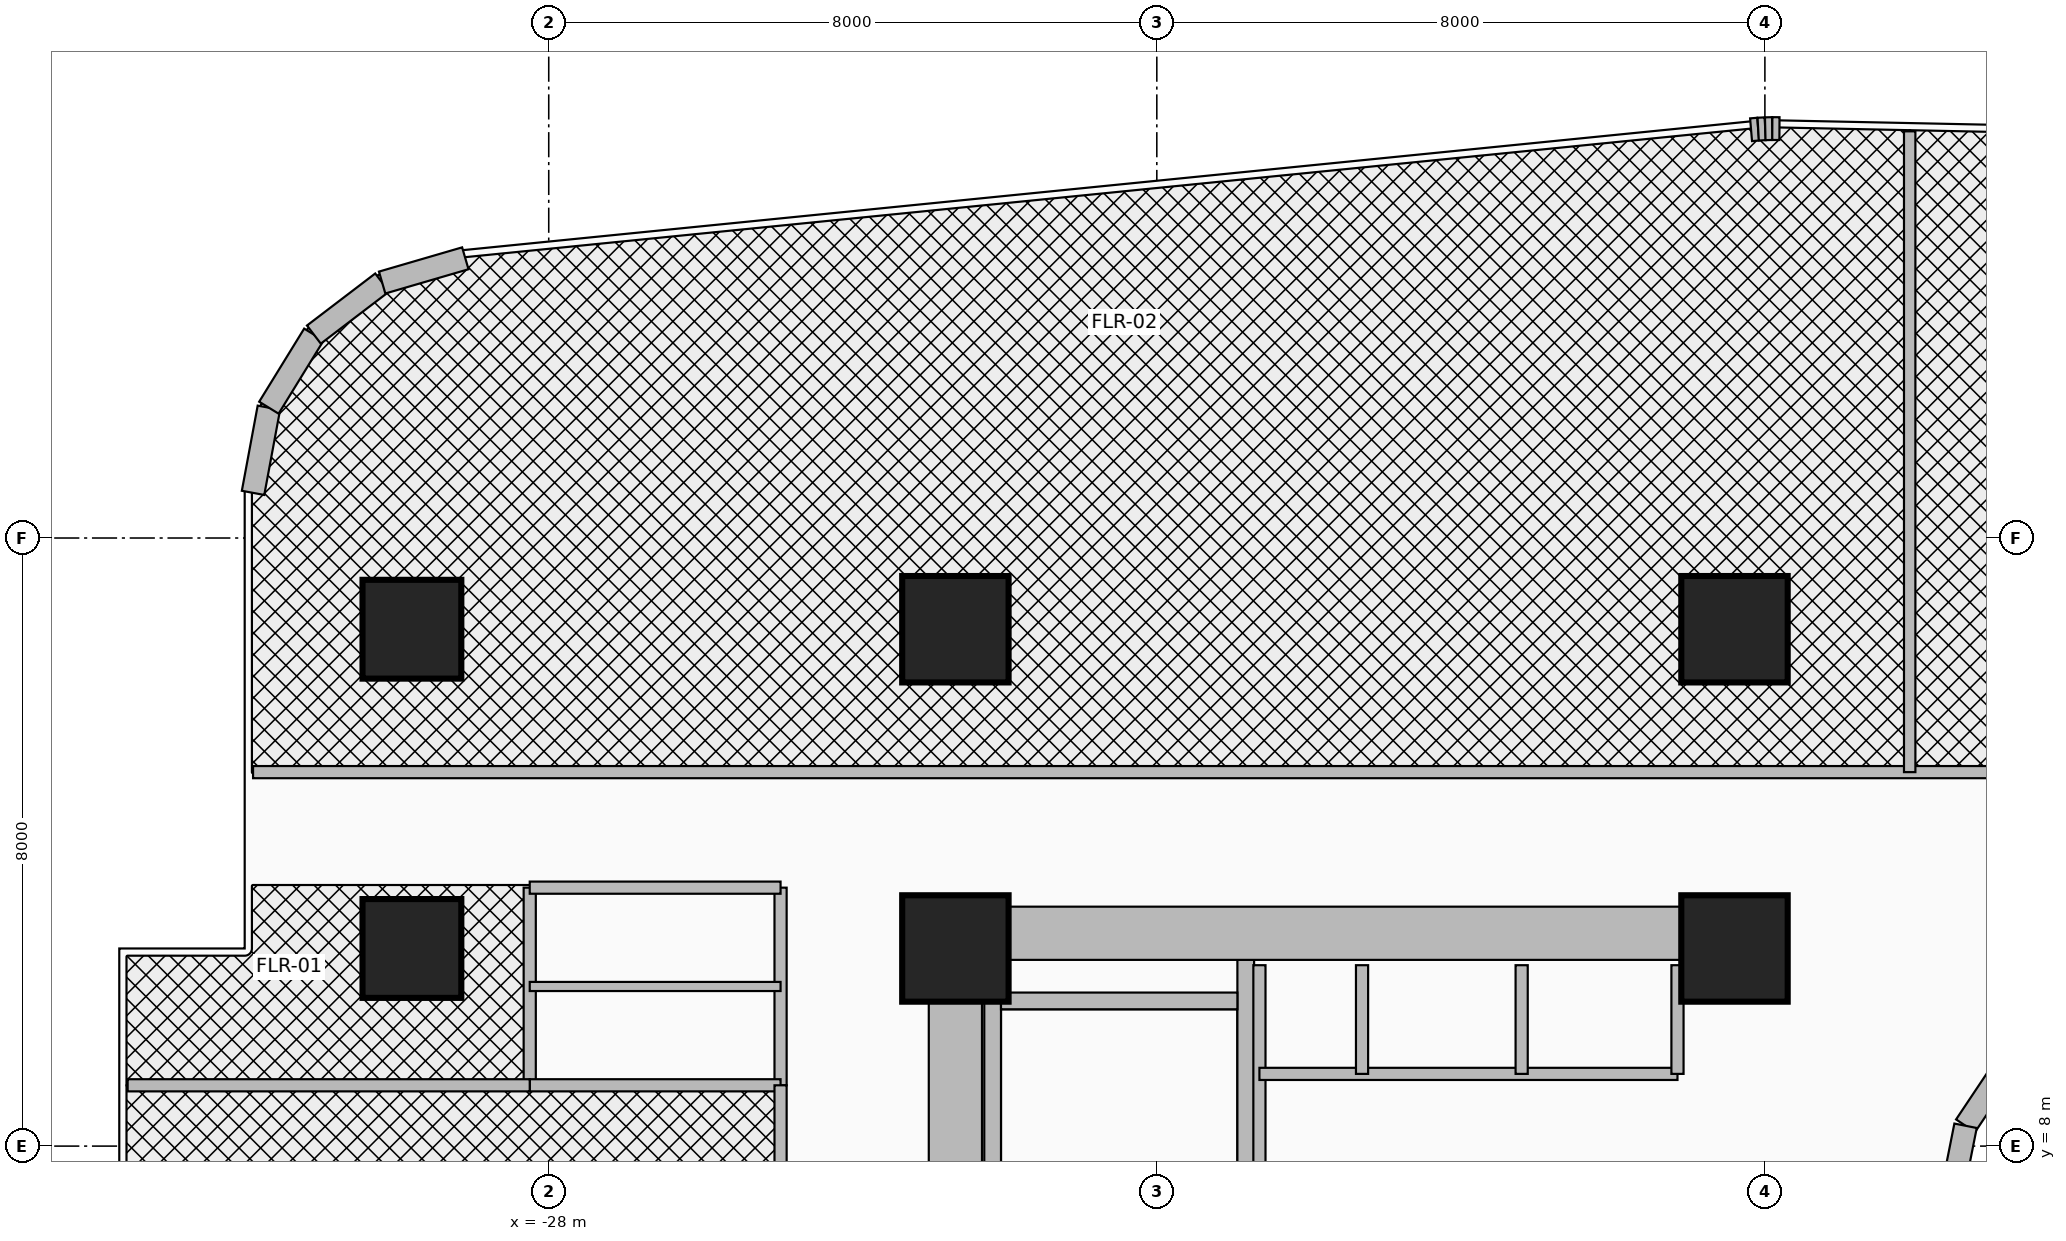
"""IFC4 building model, lengths in metres.
Left out: names, types, materials, properties, quantities, classifications, styles, units other than length and angle.
Written with IfcOpenShell. Run it as: python <this file> out.ifc"""

import sys

from ifc_helpers import new_model, si_unit, direction, frame, frame_2d, origin, origin_2d, place, context, subcontext, project, spatial, rectangle, circle, extrude, source, transform, mapped, element, fill, save


model = new_model("IFC4")
c1 = context("Model", 3, precision=1e-05, world=origin(), true_north=direction((0.0, 1.0)))
c2 = subcontext(c1, "Body", "Model", "MODEL_VIEW")
j1 = project(units=[si_unit("LENGTHUNIT", "METRE"), si_unit("PLANEANGLEUNIT", "RADIAN")], contexts=[c1])
p1 = place(None, origin())
s1 = spatial("IfcSite", under=j1, at=p1, CompositionType="ELEMENT")
p2 = place(p1, origin())
s2 = spatial("IfcBuilding", under=s1, at=p2, CompositionType="ELEMENT")
p3 = place(p2, frame((0.0, 0.0, 70.4)))
s3 = spatial("IfcBuildingStorey", under=s2, at=p3, CompositionType="ELEMENT", Elevation=70.4)
for number, where, z_axis, x_axis in (
    (1, (-22.16, 1.78, 0.0), (0.0, 0.0, 1.0), (0.0, 1.0, 0.0)),
    (2, (-18.83, 1.78, 0.0), (0.0, 0.0, 1.0), (0.0, 1.0, 0.0)),
):
    element("IfcWall", number, at=place(p3, frame(where, z_axis=z_axis, x_axis=x_axis)), inside=s3, PredefinedType="SHEAR", context=c2, shape_type="SweptSolid", body=[
        extrude(rectangle(XDim=8.67, YDim=0.22, at=frame_2d((4.335, 0.0))), origin(), (0.0, 0.0, 1.0), 3.46),
    ])
p4 = place(p3, frame((-22.05, 9.91, 0.0), z_axis=(0.0, 0.0, 1.0), x_axis=(1.0, 0.0, 0.0)))
e3 = element("IfcWall", 3, at=p4, inside=s3, PredefinedType="SHEAR", context=c2, shape_type="SweptSolid", body=[
    extrude(rectangle(XDim=3.11, YDim=0.22, at=frame_2d((1.555, 0.0))), origin(), (0.0, 0.0, 1.0), 3.46),
])
p5 = place(p3, frame((-22.65, -11.15, 0.0), z_axis=(0.0, 0.0, 1.0), x_axis=(0.0, 1.0, 0.0)))
e4 = element("IfcWall", 4, at=p5, inside=s3, PredefinedType="SHEAR", context=c2, shape_type="SweptSolid", body=[
    extrude(rectangle(XDim=22.3, YDim=0.7, at=frame_2d((11.15, 0.0))), origin(), (0.0, 0.0, 1.0), 3.46),
])
p6 = place(p3, frame((-22.65, 10.8, 0.0), z_axis=(0.0, 0.0, 1.0), x_axis=(1.0, 0.0, 0.0)))
e5 = element("IfcWall", 5, at=p6, inside=s3, PredefinedType="SHEAR", context=c2, shape_type="SweptSolid", body=[
    extrude(rectangle(XDim=10.25, YDim=0.7, at=frame_2d((5.125, 0.0))), origin(), (0.0, 0.0, 1.0), 3.46),
])
m1 = source(origin(), c2, "Body", "SweptSolid", [
    extrude(circle(Radius=0.65, at=origin_2d()), origin(), (0.0, 0.0, 1.0), 3.7),
])
p7 = place(p3, frame((-29.8, 10.6, 0.0), z_axis=(0.0, 0.0, 1.0), x_axis=(1.0, 0.0, 0.0)))
e6 = element("IfcColumn", 6, at=p7, inside=s3, PredefinedType="COLUMN", context=c2, shape_type="MappedRepresentation", body=[
    mapped(m1, transform((0.0, 0.0, 0.0), x_axis=(1.0, 0.0, 0.0), y_axis=(0.0, 1.0, 0.0), z_axis=(0.0, 0.0, 1.0), scale=1.0)),
])
m2 = source(origin(), c2, "Body", "SweptSolid", [
    extrude(rectangle(XDim=1.4, YDim=1.4, at=origin_2d()), origin(), (0.0, 0.0, 1.0), 3.7),
])
for number, where, z_axis, x_axis in (
    (7, (-22.65, 10.6, 0.0), (0.0, 0.0, 1.0), (1.0, 0.0, 0.0)),
    (8, (-12.4, 10.6, 0.0), (0.0, 0.0, 1.0), (1.0, 0.0, 0.0)),
):
    element("IfcColumn", number, at=place(p3, frame(where, z_axis=z_axis, x_axis=x_axis)), inside=s3, PredefinedType="COLUMN", context=c2, shape_type="MappedRepresentation", body=[
        mapped(m2, transform((0.0, 0.0, 0.0), x_axis=(1.0, 0.0, 0.0), y_axis=(0.0, 1.0, 0.0), z_axis=(0.0, 0.0, 1.0), scale=1.0)),
    ])
p8 = place(p3, frame((-29.8, 14.8, 0.0), z_axis=(0.0, 0.0, 1.0), x_axis=(1.0, 0.0, 0.0)))
e9 = element("IfcColumn", 9, at=p8, inside=s3, PredefinedType="COLUMN", context=c2, shape_type="MappedRepresentation", body=[
    mapped(m1, transform((0.0, 0.0, 0.0), x_axis=(1.0, 0.0, 0.0), y_axis=(0.0, 1.0, 0.0), z_axis=(0.0, 0.0, 1.0), scale=1.0)),
])
for number, where, z_axis, x_axis in (
    (10, (-22.65, 14.8, 0.0), (0.0, 0.0, 1.0), (1.0, 0.0, 0.0)),
    (11, (-12.4, 14.8, 0.0), (0.0, 0.0, 1.0), (1.0, 0.0, 0.0)),
):
    element("IfcColumn", number, at=place(p3, frame(where, z_axis=z_axis, x_axis=x_axis)), inside=s3, PredefinedType="COLUMN", context=c2, shape_type="MappedRepresentation", body=[
        mapped(m2, transform((0.0, 0.0, 0.0), x_axis=(1.0, 0.0, 0.0), y_axis=(0.0, 1.0, 0.0), z_axis=(0.0, 0.0, 1.0), scale=1.0)),
    ])
p9 = place(p3, frame((-31.89, 16.594, 0.0), z_axis=(0.0, 0.0, 1.0), x_axis=(0.182748995683, 0.9831596028, 0.0)))
e12 = element("IfcWall", 12, at=p9, inside=s3, PredefinedType="SOLIDWALL", context=c2, shape_type="SweptSolid", body=[
    extrude(rectangle(XDim=1.14, YDim=0.3, at=frame_2d((0.57, 0.0))), origin(), (0.0, 0.0, 1.0), 3.46),
])
p10 = place(p3, frame((-31.682, 17.714, 0.0), z_axis=(0.0, 0.0, 1.0), x_axis=(0.524157723014, 0.8516212077, 0.0)))
e13 = element("IfcWall", 13, at=p10, inside=s3, PredefinedType="SOLIDWALL", context=c2, shape_type="SweptSolid", body=[
    extrude(rectangle(XDim=1.129, YDim=0.3, at=frame_2d((0.565, 0.0))), origin(), (0.0, 0.0, 1.0), 3.46),
])
p11 = place(p3, frame((-31.09, 18.676, 0.0), z_axis=(0.0, 0.0, 1.0), x_axis=(0.795253002434, 0.606277710393, 0.0)))
e14 = element("IfcWall", 14, at=p11, inside=s3, PredefinedType="SOLIDWALL", context=c2, shape_type="SweptSolid", body=[
    extrude(rectangle(XDim=1.129, YDim=0.3, at=frame_2d((0.564, 0.0))), origin(), (0.0, 0.0, 1.0), 3.46),
])
p12 = place(p3, frame((-30.192, 19.361, 0.0), z_axis=(0.0, 0.0, 1.0), x_axis=(0.960071941549, 0.279753225271, 0.0)))
e15 = element("IfcWall", 15, at=p12, inside=s3, PredefinedType="SOLIDWALL", context=c2, shape_type="SweptSolid", body=[
    extrude(rectangle(XDim=1.14, YDim=0.3, at=frame_2d((0.57, 0.0))), origin(), (0.0, 0.0, 1.0), 3.46),
])
p13 = place(p3, frame((-12.182, 21.371, 0.0), z_axis=(0.0, 0.0, 1.0), x_axis=(0.996527790842, 0.08326080759, 0.0)))
e16 = element("IfcWall", 16, at=p13, inside=s3, PredefinedType="SOLIDWALL", context=c2, shape_type="SweptSolid", body=[
    extrude(rectangle(XDim=0.094, YDim=0.3, at=frame_2d((0.047, 0.0))), origin(), (0.0, 0.0, 1.0), 3.46),
])
p14 = place(p3, frame((-12.088, 21.379, 0.0), z_axis=(0.0, 0.0, 1.0), x_axis=(0.998476480444, 0.055178963393, 0.0)))
e17 = element("IfcWall", 17, at=p14, inside=s3, PredefinedType="SOLIDWALL", context=c2, shape_type="SweptSolid", body=[
    extrude(rectangle(XDim=0.093, YDim=0.3, at=frame_2d((0.046, 0.0))), origin(), (0.0, 0.0, 1.0), 3.46),
])
p15 = place(p3, frame((-11.996, 21.384, 0.0), z_axis=(0.0, 0.0, 1.0), x_axis=(0.999722573757, 0.023553673204, 0.0)))
e18 = element("IfcWall", 18, at=p15, inside=s3, PredefinedType="SOLIDWALL", context=c2, shape_type="SweptSolid", body=[
    extrude(rectangle(XDim=0.093, YDim=0.3, at=frame_2d((0.047, 0.0))), origin(), (0.0, 0.0, 1.0), 3.46),
])
p16 = place(p3, frame((-11.902, 21.386, 0.0), z_axis=(0.0, 0.0, 1.0), x_axis=(0.999986507273, -0.005194735103, 0.0)))
e19 = element("IfcWall", 19, at=p16, inside=s3, PredefinedType="SOLIDWALL", context=c2, shape_type="SweptSolid", body=[
    extrude(rectangle(XDim=0.094, YDim=0.3, at=frame_2d((0.047, 0.0))), origin(), (0.0, 0.0, 1.0), 3.46),
])
p17 = place(p3, frame((-8.642, 9.342, 0.0), z_axis=(0.0, 0.0, 1.0), x_axis=(-0.555615398575, -0.831439431869, 0.0)))
e20 = element("IfcWall", 20, at=p17, inside=s3, PredefinedType="SOLIDWALL", context=c2, shape_type="SweptSolid", body=[
    extrude(rectangle(XDim=1.292, YDim=0.3, at=frame_2d((0.646, 0.0))), origin(), (0.0, 0.0, 1.0), 3.46),
])
p18 = place(p3, frame((-9.36, 8.268, 0.0), z_axis=(0.0, 0.0, 1.0), x_axis=(-0.195090163074, -0.980785312019, 0.0)))
e21 = element("IfcWall", 21, at=p18, inside=s3, PredefinedType="SOLIDWALL", context=c2, shape_type="SweptSolid", body=[
    extrude(rectangle(XDim=1.281, YDim=0.3, at=frame_2d((0.641, 0.0))), origin(), (0.0, 0.0, 1.0), 3.46),
])
p19 = place(p3, frame((-18.65, 7.45, 0.0), z_axis=(0.0, 0.0, 1.0), x_axis=(0.0, 1.0, 0.0)))
e22 = element("IfcWall", 22, at=p19, inside=s3, PredefinedType="PARTITIONING", context=c2, shape_type="SweptSolid", body=[
    extrude(rectangle(XDim=2.93, YDim=0.16, at=frame_2d((1.465, 0.0))), origin(), (0.0, 0.0, 1.0), 3.46),
])
p20 = place(p3, frame((-18.65, 8.95, 0.0), z_axis=(0.0, 0.0, 1.0), x_axis=(1.0, 0.0, 0.0)))
e23 = element("IfcWall", 23, at=p20, inside=s3, PredefinedType="PARTITIONING", context=c2, shape_type="SweptSolid", body=[
    extrude(rectangle(XDim=5.5, YDim=0.16, at=frame_2d((2.75, 0.0))), origin(), (0.0, 0.0, 1.0), 3.46),
])
p21 = place(p20, frame((0.3, 0.0, 0.0)))
e24 = element("IfcOpeningElement", 24, at=p21, cuts=e23, PredefinedType="OPENING", context=c2, shape_type="SweptSolid", body=[
    extrude(rectangle(XDim=0.85, YDim=2.05, at=frame_2d((0.425, 1.025))), frame((0.0, 0.095, 0.0), z_axis=(0.0, -1.0, 0.0), x_axis=(1.0, 0.0, 0.0)), (0.0, 0.0, 1.0), 0.19),
])
p22 = place(p20, frame((1.85, 0.0, 0.0)))
e25 = element("IfcOpeningElement", 25, at=p22, cuts=e23, PredefinedType="OPENING", context=c2, shape_type="SweptSolid", body=[
    extrude(rectangle(XDim=0.85, YDim=2.05, at=frame_2d((0.425, 1.025))), frame((0.0, 0.095, 0.0), z_axis=(0.0, -1.0, 0.0), x_axis=(1.0, 0.0, 0.0)), (0.0, 0.0, 1.0), 0.19),
])
p23 = place(p20, frame((3.9, 0.0, 0.0)))
e26 = element("IfcOpeningElement", 26, at=p23, cuts=e23, PredefinedType="OPENING", context=c2, shape_type="SweptSolid", body=[
    extrude(rectangle(XDim=0.85, YDim=2.05, at=frame_2d((0.425, 1.025))), frame((0.0, 0.095, 0.0), z_axis=(0.0, -1.0, 0.0), x_axis=(1.0, 0.0, 0.0)), (0.0, 0.0, 1.0), 0.19),
])
for number, where, z_axis, x_axis in (
    (27, (-13.15, 8.95, 0.0), (0.0, 0.0, 1.0), (0.0, 1.0, 0.0)),
    (28, (-17.3, 8.95, 0.0), (0.0, 0.0, 1.0), (0.0, 1.0, 0.0)),
    (29, (-15.2, 8.95, 0.0), (0.0, 0.0, 1.0), (0.0, 1.0, 0.0)),
):
    element("IfcWall", number, at=place(p3, frame(where, z_axis=z_axis, x_axis=x_axis)), inside=s3, PredefinedType="PARTITIONING", context=c2, shape_type="SweptSolid", body=[
        extrude(rectangle(XDim=1.43, YDim=0.16, at=frame_2d((0.715, 0.0))), origin(), (0.0, 0.0, 1.0), 3.46),
    ])
p24 = place(p3, frame((-28.25, 8.8, 0.0), z_axis=(0.0, 0.0, 1.0), x_axis=(0.0, 1.0, 0.0)))
e30 = element("IfcWall", 30, at=p24, inside=s3, PredefinedType="PARTITIONING", context=c2, shape_type="SweptSolid", body=[
    extrude(rectangle(XDim=2.6, YDim=0.16, at=frame_2d((1.3, 0.0))), origin(), (0.0, 0.0, 1.0), 2.583),
])
p25 = place(p3, frame((-24.95, 8.8, 0.0), z_axis=(0.0, 0.0, 1.0), x_axis=(0.0, 1.0, 0.0)))
e31 = element("IfcWall", 31, at=p25, inside=s3, PredefinedType="PARTITIONING", context=c2, shape_type="SweptSolid", body=[
    extrude(rectangle(XDim=2.6, YDim=0.16, at=frame_2d((1.3, 0.0))), origin(), (0.0, 0.0, 1.0), 2.583),
])
p26 = place(p25, frame((0.3, 0.0, 0.0)))
e32 = element("IfcOpeningElement", 32, at=p26, cuts=e31, PredefinedType="OPENING", context=c2, shape_type="SweptSolid", body=[
    extrude(rectangle(XDim=0.85, YDim=2.1, at=frame_2d((0.425, 1.05))), frame((0.0, 0.095, 0.0), z_axis=(0.0, -1.0, 0.0), x_axis=(1.0, 0.0, 0.0)), (0.0, 0.0, 1.0), 0.19),
])
p27 = place(p25, frame((1.45, 0.0, 0.0)))
e33 = element("IfcOpeningElement", 33, at=p27, cuts=e31, PredefinedType="OPENING", context=c2, shape_type="SweptSolid", body=[
    extrude(rectangle(XDim=0.85, YDim=2.1, at=frame_2d((0.425, 1.05))), frame((0.0, 0.095, 0.0), z_axis=(0.0, -1.0, 0.0), x_axis=(1.0, 0.0, 0.0)), (0.0, 0.0, 1.0), 0.19),
])
for number, where, z_axis, x_axis in (
    (34, (-28.25, 8.8, 0.0), (0.0, 0.0, 1.0), (1.0, 0.0, 0.0)),
    (35, (-28.25, 11.4, 0.0), (0.0, 0.0, 1.0), (1.0, 0.0, 0.0)),
):
    element("IfcWall", number, at=place(p3, frame(where, z_axis=z_axis, x_axis=x_axis)), inside=s3, PredefinedType="PARTITIONING", context=c2, shape_type="SweptSolid", body=[
        extrude(rectangle(XDim=3.3, YDim=0.16, at=frame_2d((1.65, 0.0))), origin(), (0.0, 0.0, 1.0), 3.46),
    ])
p28 = place(p3, frame((-28.25, 10.1, 0.0), z_axis=(0.0, 0.0, 1.0), x_axis=(1.0, 0.0, 0.0)))
e36 = element("IfcWall", 36, at=p28, inside=s3, PredefinedType="PARTITIONING", context=c2, shape_type="SweptSolid", body=[
    extrude(rectangle(XDim=3.3, YDim=0.12, at=frame_2d((1.65, 0.0))), origin(), (0.0, 0.0, 1.0), 3.46),
])
p29 = place(p3, frame((-24.95, -11.42, 0.0), z_axis=(0.0, 0.0, 1.0), x_axis=(0.0, 1.0, 0.0)))
e37 = element("IfcWall", 37, at=p29, inside=s3, PredefinedType="PARTITIONING", context=c2, shape_type="SweptSolid", body=[
    extrude(rectangle(XDim=20.22, YDim=0.16, at=frame_2d((10.11, 0.0))), origin(), (0.0, 0.0, 1.0), 2.583),
])
p30 = place(p29, frame((2.47, 0.0, 0.0)))
e38 = element("IfcOpeningElement", 38, at=p30, cuts=e37, PredefinedType="OPENING", context=c2, shape_type="SweptSolid", body=[
    extrude(rectangle(XDim=1.8, YDim=2.15, at=frame_2d((0.9, 1.075))), frame((0.0, 0.095, 0.0), z_axis=(0.0, -1.0, 0.0), x_axis=(1.0, 0.0, 0.0)), (0.0, 0.0, 1.0), 0.19),
])
p31 = place(p29, frame((9.66, 0.0, 0.0)))
e39 = element("IfcOpeningElement", 39, at=p31, cuts=e37, PredefinedType="OPENING", context=c2, shape_type="SweptSolid", body=[
    extrude(rectangle(XDim=0.9, YDim=2.1, at=frame_2d((0.45, 1.05))), frame((0.0, 0.095, 0.0), z_axis=(0.0, -1.0, 0.0), x_axis=(1.0, 0.0, 0.0)), (0.0, 0.0, 1.0), 0.19),
])
p32 = place(p29, frame((16.4, 0.0, 0.0)))
e40 = element("IfcOpeningElement", 40, at=p32, cuts=e37, PredefinedType="OPENING", context=c2, shape_type="SweptSolid", body=[
    extrude(rectangle(XDim=0.9, YDim=2.1, at=frame_2d((0.45, 1.05))), frame((0.0, 0.095, 0.0), z_axis=(0.0, -1.0, 0.0), x_axis=(1.0, 0.0, 0.0)), (0.0, 0.0, 1.0), 0.19),
])
p33 = place(p3, frame((-33.54, 8.8, 0.0), z_axis=(0.0, 0.0, 1.0), x_axis=(1.0, 0.0, 0.0)))
e41 = element("IfcWall", 41, at=p33, inside=s3, PredefinedType="PARTITIONING", context=c2, shape_type="SweptSolid", body=[
    extrude(rectangle(XDim=5.29, YDim=0.16, at=frame_2d((2.645, 0.0))), origin(), (0.0, 0.0, 1.0), 2.896),
])
p34 = place(p33, frame((2.08, 0.0, 0.0)))
e42 = element("IfcOpeningElement", 42, at=p34, cuts=e41, PredefinedType="OPENING", context=c2, shape_type="SweptSolid", body=[
    extrude(rectangle(XDim=0.9, YDim=2.1, at=frame_2d((0.45, 1.05))), frame((0.0, 0.095, 0.0), z_axis=(0.0, -1.0, 0.0), x_axis=(1.0, 0.0, 0.0)), (0.0, 0.0, 1.0), 0.19),
])
p35 = place(p3, frame((-31.89, 12.92, 0.0), z_axis=(0.0, 0.0, 1.0), x_axis=(1.0, 0.0, 0.0)))
e43 = element("IfcWall", 43, at=p35, inside=s3, PredefinedType="PARTITIONING", context=c2, shape_type="SweptSolid", body=[
    extrude(rectangle(XDim=45.44, YDim=0.16, at=frame_2d((22.72, 0.0))), origin(), (0.0, 0.0, 1.0), 2.583),
])
p36 = place(p35, frame((10.448, 0.0, 0.0)))
e44 = element("IfcOpeningElement", 44, at=p36, cuts=e43, PredefinedType="OPENING", context=c2, shape_type="SweptSolid", body=[
    extrude(rectangle(XDim=0.9, YDim=2.1, at=frame_2d((0.45, 1.05))), frame((0.0, 0.095, 0.0), z_axis=(0.0, -1.0, 0.0), x_axis=(1.0, 0.0, 0.0)), (0.0, 0.0, 1.0), 0.19),
])
p37 = place(p35, frame((33.167, 0.0, 0.0)))
e45 = element("IfcOpeningElement", 45, at=p37, cuts=e43, PredefinedType="OPENING", context=c2, shape_type="SweptSolid", body=[
    extrude(rectangle(XDim=0.9, YDim=2.1, at=frame_2d((0.45, 1.05))), frame((0.0, 0.095, 0.0), z_axis=(0.0, -1.0, 0.0), x_axis=(1.0, 0.0, 0.0)), (0.0, 0.0, 1.0), 0.19),
])
p38 = place(p3, frame((-10.095, 12.92, 0.0), z_axis=(0.0, 0.0, 1.0), x_axis=(0.0, 1.0, 0.0)))
e46 = element("IfcWall", 46, at=p38, inside=s3, PredefinedType="PARTITIONING", context=c2, shape_type="SweptSolid", body=[
    extrude(rectangle(XDim=8.43, YDim=0.15, at=frame_2d((4.215, 0.0))), origin(), (0.0, 0.0, 1.0), 2.583),
])
p39 = place(p21, origin())
e47 = element("IfcDoor", 47, at=p39, inside=s3, OperationType="SINGLE_SWING_LEFT", PredefinedType="DOOR", context=c2, shape_type="SweptSolid", body=[
    extrude(rectangle(XDim=0.85, YDim=2.05, at=frame_2d((0.425, 1.025))), frame((0.0, 0.025, 0.0), z_axis=(0.0, -1.0, 0.0), x_axis=(1.0, 0.0, 0.0)), (0.0, 0.0, 1.0), 0.05),
])
fill(e24, e47)
p40 = place(p22, origin())
e48 = element("IfcDoor", 48, at=p40, inside=s3, OperationType="SINGLE_SWING_RIGHT", PredefinedType="DOOR", context=c2, shape_type="SweptSolid", body=[
    extrude(rectangle(XDim=0.85, YDim=2.05, at=frame_2d((0.425, 1.025))), frame((0.0, 0.025, 0.0), z_axis=(0.0, -1.0, 0.0), x_axis=(1.0, 0.0, 0.0)), (0.0, 0.0, 1.0), 0.05),
])
fill(e25, e48)
p41 = place(p23, origin())
e49 = element("IfcDoor", 49, at=p41, inside=s3, OperationType="SINGLE_SWING_LEFT", PredefinedType="DOOR", context=c2, shape_type="SweptSolid", body=[
    extrude(rectangle(XDim=0.85, YDim=2.05, at=frame_2d((0.425, 1.025))), frame((0.0, 0.025, 0.0), z_axis=(0.0, -1.0, 0.0), x_axis=(1.0, 0.0, 0.0)), (0.0, 0.0, 1.0), 0.05),
])
fill(e26, e49)
p42 = place(p26, origin())
e50 = element("IfcDoor", 50, at=p42, inside=s3, OperationType="SINGLE_SWING_RIGHT", PredefinedType="DOOR", context=c2, shape_type="SweptSolid", body=[
    extrude(rectangle(XDim=0.85, YDim=2.1, at=frame_2d((0.425, 1.05))), frame((0.0, 0.025, 0.0), z_axis=(0.0, -1.0, 0.0), x_axis=(1.0, 0.0, 0.0)), (0.0, 0.0, 1.0), 0.05),
])
fill(e32, e50)
p43 = place(p27, origin())
e51 = element("IfcDoor", 51, at=p43, inside=s3, OperationType="SINGLE_SWING_LEFT", PredefinedType="DOOR", context=c2, shape_type="SweptSolid", body=[
    extrude(rectangle(XDim=0.85, YDim=2.1, at=frame_2d((0.425, 1.05))), frame((0.0, 0.025, 0.0), z_axis=(0.0, -1.0, 0.0), x_axis=(1.0, 0.0, 0.0)), (0.0, 0.0, 1.0), 0.05),
])
fill(e33, e51)
p44 = place(p34, origin())
e52 = element("IfcDoor", 52, at=p44, inside=s3, OperationType="SINGLE_SWING_RIGHT", PredefinedType="DOOR", context=c2, shape_type="SweptSolid", body=[
    extrude(rectangle(XDim=0.9, YDim=2.1, at=frame_2d((0.45, 1.05))), frame((0.0, 0.025, 0.0), z_axis=(0.0, -1.0, 0.0), x_axis=(1.0, 0.0, 0.0)), (0.0, 0.0, 1.0), 0.05),
])
fill(e42, e52)
p45 = place(p36, frame((0.9, 0.0, 0.0), z_axis=(0.0, 0.0, 1.0), x_axis=(-1.0, 0.0, 0.0)))
e53 = element("IfcDoor", 53, at=p45, inside=s3, OperationType="SINGLE_SWING_LEFT", PredefinedType="DOOR", context=c2, shape_type="SweptSolid", body=[
    extrude(rectangle(XDim=0.9, YDim=2.1, at=frame_2d((0.45, 1.05))), frame((0.0, 0.025, 0.0), z_axis=(0.0, -1.0, 0.0), x_axis=(1.0, 0.0, 0.0)), (0.0, 0.0, 1.0), 0.05),
])
fill(e44, e53)
save(model, sys.argv[1])
